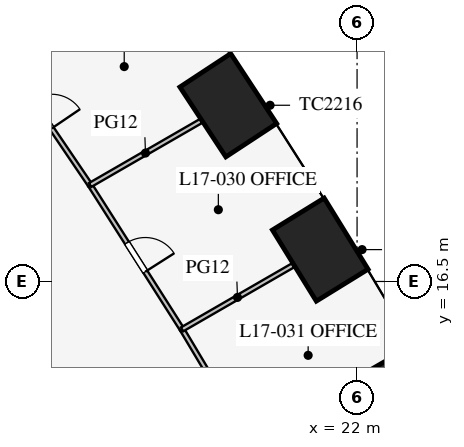
"""IFC4 building model, lengths in metres.
Left out: names, types, materials, properties, quantities, classifications, styles, units other than length and angle.
Written with IfcOpenShell. Run it as: python <this file> out.ifc"""

import sys

from ifc_helpers import new_model, si_unit, direction, frame, frame_2d, origin, origin_2d, place, context, subcontext, project, spatial, rectangle, extrude, element, fill, save


model = new_model("IFC4")
c1 = context("Model", 3, precision=1e-05, world=origin(), true_north=direction((0.0, 1.0)))
c2 = subcontext(c1, "Body", "Model", "MODEL_VIEW")
j1 = project(units=[si_unit("LENGTHUNIT", "METRE"), si_unit("PLANEANGLEUNIT", "RADIAN")], contexts=[c1])
p1 = place(None, origin())
s1 = spatial("IfcSite", under=j1, at=p1, CompositionType="ELEMENT")
p2 = place(p1, origin())
s2 = spatial("IfcBuilding", under=s1, at=p2, CompositionType="ELEMENT")
p3 = place(p2, frame((0.0, 0.0, 75.3)))
s3 = spatial("IfcBuildingStorey", under=s2, at=p3, CompositionType="ELEMENT", Elevation=75.3)
for number, where, z_axis, x_axis in (
    (1, (23.338, 13.474, 0.0), (0.0, 0.0, 1.0), (-0.5, 0.866, 0.0)),
    (2, (21.031, 17.339, 0.0), (0.0, 0.0, 1.0), (-0.525, 0.851, 0.0)),
    (3, (18.611, 21.137, 0.0), (0.0, 0.0, 1.0), (-0.549, 0.836, 0.0)),
):
    element("IfcColumn", number, at=place(p3, frame(where, z_axis=z_axis, x_axis=x_axis)), inside=s3, PredefinedType="COLUMN", context=c2, shape_type="SweptSolid", body=[
        extrude(rectangle(XDim=2.2, YDim=1.6, at=origin_2d()), origin(), (0.0, 0.0, 1.0), 4.2),
    ])
p4 = place(p3, frame((16.743, -3.0, 0.0), z_axis=(0.0, 0.0, 1.0), x_axis=(-0.500002442456, 0.866023993627, 0.0)))
e4 = element("IfcWall", 4, at=p4, inside=s3, PredefinedType="SHEAR", context=c2, shape_type="SweptSolid", body=[
    extrude(rectangle(XDim=21.939, YDim=0.8, at=frame_2d((10.97, 0.0))), origin(), (0.0, 0.0, 1.0), 4.2),
])
p5 = place(p4, frame((17.27, 0.0, 0.0)))
e5 = element("IfcOpeningElement", 5, at=p5, cuts=e4, PredefinedType="OPENING", context=c2, shape_type="SweptSolid", body=[
    extrude(rectangle(XDim=1.2, YDim=2.1, at=frame_2d((0.6, 1.05))), frame((0.0, 0.41, 0.0), z_axis=(0.0, -1.0, 0.0), x_axis=(1.0, 0.0, 0.0)), (0.0, 0.0, 1.0), 0.82),
])
p6 = place(p4, frame((3.47, 0.0, 0.0)))
e6 = element("IfcOpeningElement", 6, at=p6, cuts=e4, PredefinedType="OPENING", context=c2, shape_type="SweptSolid", body=[
    extrude(rectangle(XDim=1.2, YDim=2.1, at=frame_2d((0.6, 1.05))), frame((0.0, 0.41, 0.0), z_axis=(0.0, -1.0, 0.0), x_axis=(1.0, 0.0, 0.0)), (0.0, 0.0, 1.0), 0.82),
])
p7 = place(p3, frame((26.415, -15.231, 0.0), z_axis=(0.0, 0.0, 1.0), x_axis=(-0.50000091641, 0.866024874695, 0.0)))
e7 = element("IfcWall", 7, at=p7, inside=s3, PredefinedType="PARTITIONING", context=c2, shape_type="SweptSolid", body=[
    extrude(rectangle(XDim=52.796, YDim=0.12, at=frame_2d((26.398, 0.0))), origin(), (0.0, 0.0, 1.0), 2.9),
])
p8 = place(p7, frame((10.2, 0.0, 0.15)))
e8 = element("IfcOpeningElement", 8, at=p8, cuts=e7, PredefinedType="OPENING", context=c2, shape_type="SweptSolid", body=[
    extrude(rectangle(XDim=1.8, YDim=2.1, at=frame_2d((0.9, 1.05))), frame((0.0, 0.07, 0.0), z_axis=(0.0, -1.0, 0.0), x_axis=(1.0, 0.0, 0.0)), (0.0, 0.0, 1.0), 0.14),
])
p9 = place(p7, frame((40.8, 0.0, 0.15)))
e9 = element("IfcOpeningElement", 9, at=p9, cuts=e7, PredefinedType="OPENING", context=c2, shape_type="SweptSolid", body=[
    extrude(rectangle(XDim=1.8, YDim=2.1, at=frame_2d((0.9, 1.05))), frame((0.0, 0.07, 0.0), z_axis=(0.0, -1.0, 0.0), x_axis=(1.0, 0.0, 0.0)), (0.0, 0.0, 1.0), 0.14),
])
p10 = place(p3, frame((19.701, 11.374, 0.0), z_axis=(0.0, 0.0, 1.0), x_axis=(-0.512483962191, 0.858696796604, 0.0)))
e10 = element("IfcWall", 10, at=p10, inside=s3, PredefinedType="PARTITIONING", context=c2, shape_type="SweptSolid", body=[
    extrude(rectangle(XDim=4.5, YDim=0.12, at=frame_2d((2.25, 0.0))), origin(), (0.0, 0.0, 1.0), 2.9),
])
p11 = place(p10, frame((1.8, 0.0, 0.15)))
e11 = element("IfcOpeningElement", 11, at=p11, cuts=e10, PredefinedType="OPENING", context=c2, shape_type="SweptSolid", body=[
    extrude(rectangle(XDim=0.9, YDim=2.1, at=frame_2d((0.45, 1.05))), frame((0.0, 0.07, 0.0), z_axis=(0.0, -1.0, 0.0), x_axis=(1.0, 0.0, 0.0)), (0.0, 0.0, 1.0), 0.14),
])
p12 = place(p3, frame((17.395, 15.239, 0.0), z_axis=(0.0, 0.0, 1.0), x_axis=(-0.537243691336, 0.843427066272, 0.0)))
e12 = element("IfcWall", 12, at=p12, inside=s3, PredefinedType="PARTITIONING", context=c2, shape_type="SweptSolid", body=[
    extrude(rectangle(XDim=4.504, YDim=0.12, at=frame_2d((2.252, 0.0))), origin(), (0.0, 0.0, 1.0), 2.9),
])
p13 = place(p12, frame((1.8, 0.0, 0.15)))
e13 = element("IfcOpeningElement", 13, at=p13, cuts=e12, PredefinedType="OPENING", context=c2, shape_type="SweptSolid", body=[
    extrude(rectangle(XDim=0.9, YDim=2.1, at=frame_2d((0.45, 1.05))), frame((0.0, 0.07, 0.0), z_axis=(0.0, -1.0, 0.0), x_axis=(1.0, 0.0, 0.0)), (0.0, 0.0, 1.0), 0.14),
])
p14 = place(p3, frame((14.975, 19.038, 0.0), z_axis=(0.0, 0.0, 1.0), x_axis=(-0.561512004239, 0.827468591002, 0.0)))
e14 = element("IfcWall", 14, at=p14, inside=s3, PredefinedType="PARTITIONING", context=c2, shape_type="SweptSolid", body=[
    extrude(rectangle(XDim=4.512, YDim=0.12, at=frame_2d((2.256, 0.0))), origin(), (0.0, 0.0, 1.0), 2.9),
])
p15 = place(p14, frame((1.8, 0.0, 0.15)))
e15 = element("IfcOpeningElement", 15, at=p15, cuts=e14, PredefinedType="OPENING", context=c2, shape_type="SweptSolid", body=[
    extrude(rectangle(XDim=0.9, YDim=2.1, at=frame_2d((0.45, 1.05))), frame((0.0, 0.07, 0.0), z_axis=(0.0, -1.0, 0.0), x_axis=(1.0, 0.0, 0.0)), (0.0, 0.0, 1.0), 0.14),
])
p16 = place(p3, frame((17.395, 15.239, 0.0), z_axis=(0.0, 0.0, 1.0), x_axis=(0.865991297194, 0.500059069696, 0.0)))
e16 = element("IfcWall", 16, at=p16, inside=s3, PredefinedType="PARTITIONING", context=c2, shape_type="SweptSolid", body=[
    extrude(rectangle(XDim=3.369, YDim=0.12, at=frame_2d((1.685, 0.0))), origin(), (0.0, 0.0, 1.0), 2.8),
])
p17 = place(p3, frame((14.975, 19.038, 0.0), z_axis=(0.0, 0.0, 1.0), x_axis=(0.866039498442, 0.499975586543, 0.0)))
e17 = element("IfcWall", 17, at=p17, inside=s3, PredefinedType="PARTITIONING", context=c2, shape_type="SweptSolid", body=[
    extrude(rectangle(XDim=3.367, YDim=0.12, at=frame_2d((1.684, 0.0))), origin(), (0.0, 0.0, 1.0), 2.8),
])
p18 = place(p15, frame((0.9, 0.0, 0.0), z_axis=(0.0, 0.0, 1.0), x_axis=(-1.0, 0.0, 0.0)))
e18 = element("IfcDoor", 18, at=p18, inside=s3, OperationType="SINGLE_SWING_RIGHT", PredefinedType="DOOR", context=c2, shape_type="SweptSolid", body=[
    extrude(rectangle(XDim=0.9, YDim=2.1, at=frame_2d((0.45, 1.05))), frame((0.0, 0.025, 0.0), z_axis=(0.0, -1.0, 0.0), x_axis=(1.0, 0.0, 0.0)), (0.0, 0.0, 1.0), 0.05),
])
fill(e15, e18)
p19 = place(p13, frame((0.9, 0.0, 0.0), z_axis=(0.0, 0.0, 1.0), x_axis=(-1.0, 0.0, 0.0)))
e19 = element("IfcDoor", 19, at=p19, inside=s3, OperationType="SINGLE_SWING_RIGHT", PredefinedType="DOOR", context=c2, shape_type="SweptSolid", body=[
    extrude(rectangle(XDim=0.9, YDim=2.1, at=frame_2d((0.45, 1.05))), frame((0.0, 0.025, 0.0), z_axis=(0.0, -1.0, 0.0), x_axis=(1.0, 0.0, 0.0)), (0.0, 0.0, 1.0), 0.05),
])
fill(e13, e19)
save(model, sys.argv[1])
